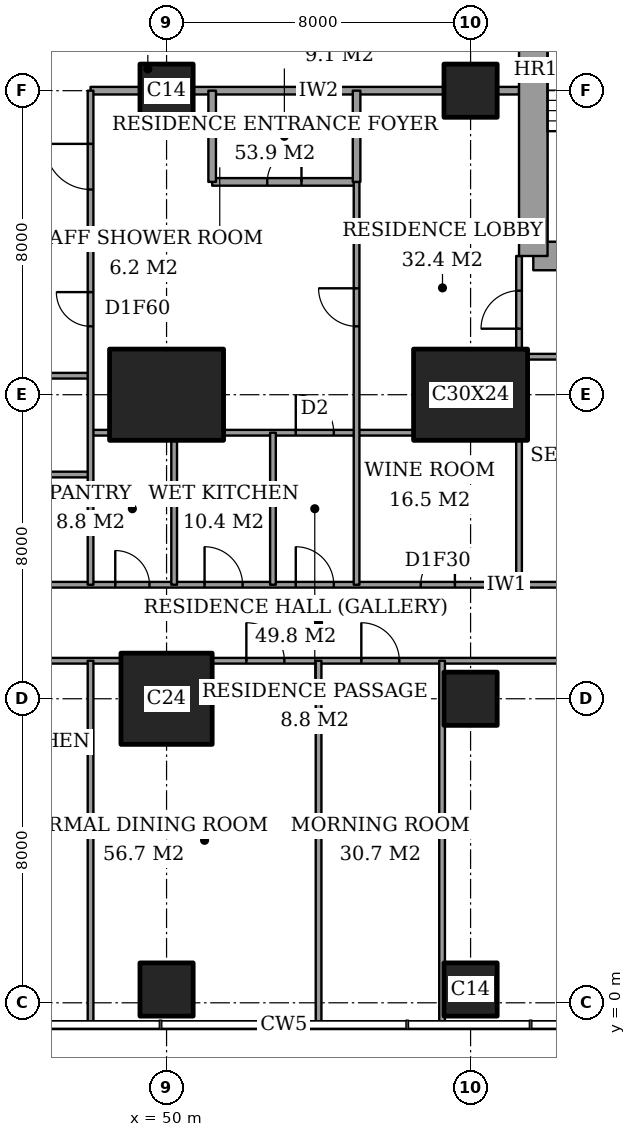
"""IFC4 building model, lengths in metres.
Left out: names, types, materials, properties, quantities, classifications, styles, units other than length and angle.
Written with IfcOpenShell. Run it as: python <this file> out.ifc"""

import sys

from ifc_helpers import new_model, si_unit, direction, frame, frame_2d, origin, origin_2d, place, context, subcontext, project, spatial, rectangle, extrude, element, fill, save


model = new_model("IFC4")
c1 = context("Model", 3, precision=1e-05, world=origin(), true_north=direction((0.0, 1.0)))
c2 = subcontext(c1, "Body", "Model", "MODEL_VIEW")
j1 = project(units=[si_unit("LENGTHUNIT", "METRE"), si_unit("PLANEANGLEUNIT", "RADIAN")], contexts=[c1])
p1 = place(None, origin())
s1 = spatial("IfcSite", under=j1, at=p1, CompositionType="ELEMENT")
p2 = place(p1, origin())
s2 = spatial("IfcBuilding", under=s1, at=p2, CompositionType="ELEMENT")
p3 = place(p2, frame((0.0, 0.0, 282.6)))
s3 = spatial("IfcBuildingStorey", under=s2, at=p3, CompositionType="ELEMENT", Elevation=282.6)
p4 = place(p3, frame((50.0, 0.35, 0.0), z_axis=(0.0, 0.0, 1.0), x_axis=(1.0, 0.0, 0.0)))
e1 = element("IfcColumn", 1, at=p4, inside=s3, PredefinedType="COLUMN", context=c2, shape_type="SweptSolid", body=[
    extrude(rectangle(XDim=1.4, YDim=1.4, at=origin_2d()), origin(), (0.0, 0.0, 1.0), 4.5),
])
p5 = place(p3, frame((50.0, 8.0, 0.0), z_axis=(0.0, 0.0, 1.0), x_axis=(1.0, 0.0, 0.0)))
e2 = element("IfcColumn", 2, at=p5, inside=s3, PredefinedType="COLUMN", context=c2, shape_type="SweptSolid", body=[
    extrude(rectangle(XDim=2.4, YDim=2.4, at=origin_2d()), origin(), (0.0, 0.0, 1.0), 4.5),
])
p6 = place(p3, frame((50.0, 16.0, 0.0), z_axis=(0.0, 0.0, 1.0), x_axis=(1.0, 0.0, 0.0)))
e3 = element("IfcColumn", 3, at=p6, inside=s3, PredefinedType="COLUMN", context=c2, shape_type="SweptSolid", body=[
    extrude(rectangle(XDim=3.0, YDim=2.4, at=origin_2d()), origin(), (0.0, 0.0, 1.0), 4.5),
])
for number, where, z_axis, x_axis in (
    (4, (50.0, 24.0, 0.0), (0.0, 0.0, 1.0), (1.0, 0.0, 0.0)),
    (5, (58.0, 0.35, 0.0), (0.0, 0.0, 1.0), (1.0, 0.0, 0.0)),
    (6, (58.0, 8.0, 0.0), (0.0, 0.0, 1.0), (1.0, 0.0, 0.0)),
):
    element("IfcColumn", number, at=place(p3, frame(where, z_axis=z_axis, x_axis=x_axis)), inside=s3, PredefinedType="COLUMN", context=c2, shape_type="SweptSolid", body=[
        extrude(rectangle(XDim=1.4, YDim=1.4, at=origin_2d()), origin(), (0.0, 0.0, 1.0), 4.5),
    ])
p7 = place(p3, frame((58.0, 16.0, 0.0), z_axis=(0.0, 0.0, 1.0), x_axis=(1.0, 0.0, 0.0)))
e7 = element("IfcColumn", 7, at=p7, inside=s3, PredefinedType="COLUMN", context=c2, shape_type="SweptSolid", body=[
    extrude(rectangle(XDim=3.0, YDim=2.4, at=origin_2d()), origin(), (0.0, 0.0, 1.0), 4.5),
])
p8 = place(p3, frame((58.0, 24.0, 0.0), z_axis=(0.0, 0.0, 1.0), x_axis=(1.0, 0.0, 0.0)))
e8 = element("IfcColumn", 8, at=p8, inside=s3, PredefinedType="COLUMN", context=c2, shape_type="SweptSolid", body=[
    extrude(rectangle(XDim=1.4, YDim=1.4, at=origin_2d()), origin(), (0.0, 0.0, 1.0), 4.5),
])
p9 = place(p3, frame((59.65, 19.65, 0.0), z_axis=(0.0, 0.0, 1.0), x_axis=(1.0, 0.0, 0.0)))
e9 = element("IfcWall", 9, at=p9, inside=s3, PredefinedType="SHEAR", context=c2, shape_type="SweptSolid", body=[
    extrude(rectangle(XDim=4.45, YDim=0.75, at=frame_2d((2.225, 0.0))), origin(), (0.0, 0.0, 1.0), 4.5),
])
p10 = place(p3, frame((59.65, 28.35, 0.0), z_axis=(0.0, 0.0, 1.0), x_axis=(0.0, -1.0, 0.0)))
e10 = element("IfcWall", 10, at=p10, inside=s3, PredefinedType="SHEAR", context=c2, shape_type="SweptSolid", body=[
    extrude(rectangle(XDim=8.7, YDim=0.75, at=frame_2d((4.35, 0.0))), origin(), (0.0, 0.0, 1.0), 4.5),
])
p11 = place(p10, frame((0.975, 0.0, 0.0)))
e11 = element("IfcOpeningElement", 11, at=p11, cuts=e10, PredefinedType="OPENING", context=c2, shape_type="SweptSolid", body=[
    extrude(rectangle(XDim=1.0, YDim=2.1, at=frame_2d((0.5, 1.05))), frame((0.0, 0.385, 0.0), z_axis=(0.0, -1.0, 0.0), x_axis=(1.0, 0.0, 0.0)), (0.0, 0.0, 1.0), 0.77),
])
p12 = place(p3, frame((43.35, 9.0, 0.0), z_axis=(0.0, 0.0, 1.0), x_axis=(1.0, 0.0, 0.0)))
e12 = element("IfcWall", 12, at=p12, inside=s3, PredefinedType="PARTITIONING", context=c2, shape_type="SweptSolid", body=[
    extrude(rectangle(XDim=5.45, YDim=0.15, at=frame_2d((2.725, 0.0))), origin(), (0.0, 0.0, 1.0), 4.25),
])
p13 = place(p12, frame((1.9, 0.0, 0.0)))
e13 = element("IfcOpeningElement", 13, at=p13, cuts=e12, PredefinedType="OPENING", context=c2, shape_type="SweptSolid", body=[
    extrude(rectangle(XDim=1.0, YDim=2.1, at=frame_2d((0.5, 1.05))), frame((0.0, 0.085, 0.0), z_axis=(0.0, -1.0, 0.0), x_axis=(1.0, 0.0, 0.0)), (0.0, 0.0, 1.0), 0.17),
])
p14 = place(p3, frame((51.2, 9.0, 0.0), z_axis=(0.0, 0.0, 1.0), x_axis=(1.0, 0.0, 0.0)))
e14 = element("IfcWall", 14, at=p14, inside=s3, PredefinedType="PARTITIONING", context=c2, shape_type="SweptSolid", body=[
    extrude(rectangle(XDim=15.25, YDim=0.15, at=frame_2d((7.625, 0.0))), origin(), (0.0, 0.0, 1.0), 4.25),
])
p15 = place(p14, frame((10.15, 0.0, 0.0)))
e15 = element("IfcOpeningElement", 15, at=p15, cuts=e14, PredefinedType="OPENING", context=c2, shape_type="SweptSolid", body=[
    extrude(rectangle(XDim=1.0, YDim=2.1, at=frame_2d((0.5, 1.05))), frame((0.0, 0.085, 0.0), z_axis=(0.0, -1.0, 0.0), x_axis=(1.0, 0.0, 0.0)), (0.0, 0.0, 1.0), 0.17),
])
p16 = place(p14, frame((3.925, 0.0, 0.0)))
e16 = element("IfcOpeningElement", 16, at=p16, cuts=e14, PredefinedType="OPENING", context=c2, shape_type="SweptSolid", body=[
    extrude(rectangle(XDim=1.0, YDim=2.1, at=frame_2d((0.5, 1.05))), frame((0.0, 0.085, 0.0), z_axis=(0.0, -1.0, 0.0), x_axis=(1.0, 0.0, 0.0)), (0.0, 0.0, 1.0), 0.17),
])
p17 = place(p14, frame((0.9, 0.0, 0.0)))
e17 = element("IfcOpeningElement", 17, at=p17, cuts=e14, PredefinedType="OPENING", context=c2, shape_type="SweptSolid", body=[
    extrude(rectangle(XDim=1.0, YDim=2.1, at=frame_2d((0.5, 1.05))), frame((0.0, 0.085, 0.0), z_axis=(0.0, -1.0, 0.0), x_axis=(1.0, 0.0, 0.0)), (0.0, 0.0, 1.0), 0.17),
])
p18 = place(p3, frame((41.439, 11.0, 0.0), z_axis=(0.0, 0.0, 1.0), x_axis=(1.0, 0.0, 0.0)))
e18 = element("IfcWall", 18, at=p18, inside=s3, PredefinedType="PARTITIONING", context=c2, shape_type="SweptSolid", body=[
    extrude(rectangle(XDim=25.011, YDim=0.15, at=frame_2d((12.505, 0.0))), origin(), (0.0, 0.0, 1.0), 4.25),
])
p19 = place(p18, frame((11.961, 0.0, 0.0)))
e19 = element("IfcOpeningElement", 19, at=p19, cuts=e18, PredefinedType="OPENING", context=c2, shape_type="SweptSolid", body=[
    extrude(rectangle(XDim=1.0, YDim=2.1, at=frame_2d((0.5, 1.05))), frame((0.0, 0.085, 0.0), z_axis=(0.0, -1.0, 0.0), x_axis=(1.0, 0.0, 0.0)), (0.0, 0.0, 1.0), 0.17),
])
p20 = place(p18, frame((20.924, 0.0, 0.0)))
e20 = element("IfcOpeningElement", 20, at=p20, cuts=e18, PredefinedType="OPENING", context=c2, shape_type="SweptSolid", body=[
    extrude(rectangle(XDim=1.0, YDim=2.1, at=frame_2d((0.5, 1.05))), frame((0.0, 0.085, 0.0), z_axis=(0.0, -1.0, 0.0), x_axis=(1.0, 0.0, 0.0)), (0.0, 0.0, 1.0), 0.17),
])
p21 = place(p18, frame((15.249, 0.0, 0.0)))
e21 = element("IfcOpeningElement", 21, at=p21, cuts=e18, PredefinedType="OPENING", context=c2, shape_type="SweptSolid", body=[
    extrude(rectangle(XDim=0.9, YDim=2.1, at=frame_2d((0.45, 1.05))), frame((0.0, 0.085, 0.0), z_axis=(0.0, -1.0, 0.0), x_axis=(1.0, 0.0, 0.0)), (0.0, 0.0, 1.0), 0.17),
])
p22 = place(p18, frame((9.561, 0.0, 0.0)))
e22 = element("IfcOpeningElement", 22, at=p22, cuts=e18, PredefinedType="OPENING", context=c2, shape_type="SweptSolid", body=[
    extrude(rectangle(XDim=1.0, YDim=2.1, at=frame_2d((0.5, 1.05))), frame((0.0, 0.085, 0.0), z_axis=(0.0, -1.0, 0.0), x_axis=(1.0, 0.0, 0.0)), (0.0, 0.0, 1.0), 0.17),
])
p23 = place(p18, frame((7.211, 0.0, 0.0)))
e23 = element("IfcOpeningElement", 23, at=p23, cuts=e18, PredefinedType="OPENING", context=c2, shape_type="SweptSolid", body=[
    extrude(rectangle(XDim=0.9, YDim=2.1, at=frame_2d((0.45, 1.05))), frame((0.0, 0.085, 0.0), z_axis=(0.0, -1.0, 0.0), x_axis=(1.0, 0.0, 0.0)), (0.0, 0.0, 1.0), 0.17),
])
p24 = place(p18, frame((2.836, 0.0, 0.0)))
e24 = element("IfcOpeningElement", 24, at=p24, cuts=e18, PredefinedType="OPENING", context=c2, shape_type="SweptSolid", body=[
    extrude(rectangle(XDim=1.0, YDim=2.1, at=frame_2d((0.5, 1.05))), frame((0.0, 0.085, 0.0), z_axis=(0.0, -1.0, 0.0), x_axis=(1.0, 0.0, 0.0)), (0.0, 0.0, 1.0), 0.17),
])
p25 = place(p3, frame((45.6, 13.9, 0.0), z_axis=(0.0, 0.0, 1.0), x_axis=(1.0, 0.0, 0.0)))
e25 = element("IfcWall", 25, at=p25, inside=s3, PredefinedType="PARTITIONING", context=c2, shape_type="SweptSolid", body=[
    extrude(rectangle(XDim=2.4, YDim=0.15, at=frame_2d((1.2, 0.0))), origin(), (0.0, 0.0, 1.0), 4.25),
])
p26 = place(p3, frame((48.0, 15.0, 0.0), z_axis=(0.0, 0.0, 1.0), x_axis=(1.0, 0.0, 0.0)))
e26 = element("IfcWall", 26, at=p26, inside=s3, PredefinedType="PARTITIONING", context=c2, shape_type="SweptSolid", body=[
    extrude(rectangle(XDim=0.5, YDim=0.15, at=frame_2d((0.25, 0.0))), origin(), (0.0, 0.0, 1.0), 4.25),
])
p27 = place(p3, frame((51.5, 15.0, 0.0), z_axis=(0.0, 0.0, 1.0), x_axis=(1.0, 0.0, 0.0)))
e27 = element("IfcWall", 27, at=p27, inside=s3, PredefinedType="PARTITIONING", context=c2, shape_type="SweptSolid", body=[
    extrude(rectangle(XDim=5.0, YDim=0.15, at=frame_2d((2.5, 0.0))), origin(), (0.0, 0.0, 1.0), 4.25),
])
p28 = place(p27, frame((1.9, 0.0, 0.0)))
e28 = element("IfcOpeningElement", 28, at=p28, cuts=e27, PredefinedType="OPENING", context=c2, shape_type="SweptSolid", body=[
    extrude(rectangle(XDim=1.0, YDim=2.1, at=frame_2d((0.5, 1.05))), frame((0.0, 0.085, 0.0), z_axis=(0.0, -1.0, 0.0), x_axis=(1.0, 0.0, 0.0)), (0.0, 0.0, 1.0), 0.17),
])
p29 = place(p3, frame((42.0, 16.5, 0.0), z_axis=(0.0, 0.0, 1.0), x_axis=(1.0, 0.0, 0.0)))
e29 = element("IfcWall", 29, at=p29, inside=s3, PredefinedType="PARTITIONING", context=c2, shape_type="SweptSolid", body=[
    extrude(rectangle(XDim=6.0, YDim=0.15, at=frame_2d((3.0, 0.0))), origin(), (0.0, 0.0, 1.0), 4.25),
])
p30 = place(p3, frame((59.5, 17.0, 0.0), z_axis=(0.0, 0.0, 1.0), x_axis=(1.0, 0.0, 0.0)))
e30 = element("IfcWall", 30, at=p30, inside=s3, PredefinedType="PARTITIONING", context=c2, shape_type="SweptSolid", body=[
    extrude(rectangle(XDim=6.95, YDim=0.15, at=frame_2d((3.475, 0.0))), origin(), (0.0, 0.0, 1.0), 4.25),
])
p31 = place(p3, frame((42.0, 20.0, 0.0), z_axis=(0.0, 0.0, 1.0), x_axis=(1.0, 0.0, 0.0)))
e31 = element("IfcWall", 31, at=p31, inside=s3, PredefinedType="PARTITIONING", context=c2, shape_type="SweptSolid", body=[
    extrude(rectangle(XDim=6.0, YDim=0.2, at=frame_2d((3.0, 0.0))), origin(), (0.0, 0.0, 1.0), 4.25),
])
p32 = place(p3, frame((51.2, 21.6, 0.0), z_axis=(0.0, 0.0, 1.0), x_axis=(1.0, 0.0, 0.0)))
e32 = element("IfcWall", 32, at=p32, inside=s3, PredefinedType="PARTITIONING", context=c2, shape_type="SweptSolid", body=[
    extrude(rectangle(XDim=3.8, YDim=0.2, at=frame_2d((1.9, 0.0))), origin(), (0.0, 0.0, 1.0), 4.25),
])
p33 = place(p32, frame((1.45, 0.0, 0.0)))
e33 = element("IfcOpeningElement", 33, at=p33, cuts=e32, PredefinedType="OPENING", context=c2, shape_type="SweptSolid", body=[
    extrude(rectangle(XDim=0.9, YDim=2.1, at=frame_2d((0.45, 1.05))), frame((0.0, 0.11, 0.0), z_axis=(0.0, -1.0, 0.0), x_axis=(1.0, 0.0, 0.0)), (0.0, 0.0, 1.0), 0.22),
])
p34 = place(p3, frame((48.0, 24.0, 0.0), z_axis=(0.0, 0.0, 1.0), x_axis=(1.0, 0.0, 0.0)))
e34 = element("IfcWall", 34, at=p34, inside=s3, PredefinedType="PARTITIONING", context=c2, shape_type="SweptSolid", body=[
    extrude(rectangle(XDim=1.3, YDim=0.2, at=frame_2d((0.65, 0.0))), origin(), (0.0, 0.0, 1.0), 4.25),
])
p35 = place(p3, frame((50.7, 24.0, 0.0), z_axis=(0.0, 0.0, 1.0), x_axis=(1.0, 0.0, 0.0)))
e35 = element("IfcWall", 35, at=p35, inside=s3, PredefinedType="PARTITIONING", context=c2, shape_type="SweptSolid", body=[
    extrude(rectangle(XDim=6.6, YDim=0.2, at=frame_2d((3.3, 0.0))), origin(), (0.0, 0.0, 1.0), 4.25),
])
p36 = place(p3, frame((58.7, 24.0, 0.0), z_axis=(0.0, 0.0, 1.0), x_axis=(1.0, 0.0, 0.0)))
e36 = element("IfcWall", 36, at=p36, inside=s3, PredefinedType="PARTITIONING", context=c2, shape_type="SweptSolid", body=[
    extrude(rectangle(XDim=0.575, YDim=0.2, at=frame_2d((0.288, 0.0))), origin(), (0.0, 0.0, 1.0), 4.25),
])
p37 = place(p3, frame((48.0, -0.561, 0.0), z_axis=(0.0, 0.0, 1.0), x_axis=(0.0, 1.0, 0.0)))
e37 = element("IfcWall", 37, at=p37, inside=s3, PredefinedType="PARTITIONING", context=c2, shape_type="SweptSolid", body=[
    extrude(rectangle(XDim=9.561, YDim=0.15, at=frame_2d((4.781, 0.0))), origin(), (0.0, 0.0, 1.0), 4.25),
])
p38 = place(p3, frame((48.0, 11.0, 0.0), z_axis=(0.0, 0.0, 1.0), x_axis=(0.0, 1.0, 0.0)))
e38 = element("IfcWall", 38, at=p38, inside=s3, PredefinedType="PARTITIONING", context=c2, shape_type="SweptSolid", body=[
    extrude(rectangle(XDim=13.0, YDim=0.15, at=frame_2d((6.5, 0.0))), origin(), (0.0, 0.0, 1.0), 4.25),
])
p39 = place(p38, frame((10.4, 0.0, 0.0)))
e39 = element("IfcOpeningElement", 39, at=p39, cuts=e38, PredefinedType="OPENING", context=c2, shape_type="SweptSolid", body=[
    extrude(rectangle(XDim=1.2, YDim=2.4, at=frame_2d((0.6, 1.2))), frame((0.0, 0.085, 0.0), z_axis=(0.0, -1.0, 0.0), x_axis=(1.0, 0.0, 0.0)), (0.0, 0.0, 1.0), 0.17),
])
p40 = place(p38, frame((6.8, 0.0, 0.0)))
e40 = element("IfcOpeningElement", 40, at=p40, cuts=e38, PredefinedType="OPENING", context=c2, shape_type="SweptSolid", body=[
    extrude(rectangle(XDim=0.9, YDim=2.1, at=frame_2d((0.45, 1.05))), frame((0.0, 0.085, 0.0), z_axis=(0.0, -1.0, 0.0), x_axis=(1.0, 0.0, 0.0)), (0.0, 0.0, 1.0), 0.17),
])
p41 = place(p3, frame((50.2, 11.0, 0.0), z_axis=(0.0, 0.0, 1.0), x_axis=(0.0, 1.0, 0.0)))
e41 = element("IfcWall", 41, at=p41, inside=s3, PredefinedType="PARTITIONING", context=c2, shape_type="SweptSolid", body=[
    extrude(rectangle(XDim=3.8, YDim=0.15, at=frame_2d((1.9, 0.0))), origin(), (0.0, 0.0, 1.0), 4.25),
])
p42 = place(p3, frame((51.2, 21.6, 0.0), z_axis=(0.0, 0.0, 1.0), x_axis=(0.0, 1.0, 0.0)))
e42 = element("IfcWall", 42, at=p42, inside=s3, PredefinedType="PARTITIONING", context=c2, shape_type="SweptSolid", body=[
    extrude(rectangle(XDim=2.4, YDim=0.2, at=frame_2d((1.2, 0.0))), origin(), (0.0, 0.0, 1.0), 4.25),
])
p43 = place(p3, frame((52.8, 11.0, 0.0), z_axis=(0.0, 0.0, 1.0), x_axis=(0.0, 1.0, 0.0)))
e43 = element("IfcWall", 43, at=p43, inside=s3, PredefinedType="PARTITIONING", context=c2, shape_type="SweptSolid", body=[
    extrude(rectangle(XDim=4.0, YDim=0.15, at=frame_2d((2.0, 0.0))), origin(), (0.0, 0.0, 1.0), 4.25),
])
p44 = place(p3, frame((54.0, -0.561, 0.0), z_axis=(0.0, 0.0, 1.0), x_axis=(0.0, 1.0, 0.0)))
e44 = element("IfcWall", 44, at=p44, inside=s3, PredefinedType="PARTITIONING", context=c2, shape_type="SweptSolid", body=[
    extrude(rectangle(XDim=9.561, YDim=0.15, at=frame_2d((4.781, 0.0))), origin(), (0.0, 0.0, 1.0), 4.25),
])
p45 = place(p3, frame((55.0, 21.6, 0.0), z_axis=(0.0, 0.0, 1.0), x_axis=(0.0, 1.0, 0.0)))
e45 = element("IfcWall", 45, at=p45, inside=s3, PredefinedType="PARTITIONING", context=c2, shape_type="SweptSolid", body=[
    extrude(rectangle(XDim=2.4, YDim=0.2, at=frame_2d((1.2, 0.0))), origin(), (0.0, 0.0, 1.0), 4.25),
])
p46 = place(p3, frame((55.0, 11.0, 0.0), z_axis=(0.0, 0.0, 1.0), x_axis=(0.0, 1.0, 0.0)))
e46 = element("IfcWall", 46, at=p46, inside=s3, PredefinedType="PARTITIONING", context=c2, shape_type="SweptSolid", body=[
    extrude(rectangle(XDim=10.6, YDim=0.15, at=frame_2d((5.3, 0.0))), origin(), (0.0, 0.0, 1.0), 4.25),
])
p47 = place(p46, frame((6.8, 0.0, 0.0)))
e47 = element("IfcOpeningElement", 47, at=p47, cuts=e46, PredefinedType="OPENING", context=c2, shape_type="SweptSolid", body=[
    extrude(rectangle(XDim=1.0, YDim=2.1, at=frame_2d((0.5, 1.05))), frame((0.0, 0.085, 0.0), z_axis=(0.0, -1.0, 0.0), x_axis=(1.0, 0.0, 0.0)), (0.0, 0.0, 1.0), 0.17),
])
p48 = place(p3, frame((57.25, -0.561, 0.0), z_axis=(0.0, 0.0, 1.0), x_axis=(0.0, 1.0, 0.0)))
e48 = element("IfcWall", 48, at=p48, inside=s3, PredefinedType="PARTITIONING", context=c2, shape_type="SweptSolid", body=[
    extrude(rectangle(XDim=9.561, YDim=0.15, at=frame_2d((4.781, 0.0))), origin(), (0.0, 0.0, 1.0), 4.25),
])
p49 = place(p3, frame((59.275, 11.0, 0.0), z_axis=(0.0, 0.0, 1.0), x_axis=(0.0, 1.0, 0.0)))
e49 = element("IfcWall", 49, at=p49, inside=s3, PredefinedType="PARTITIONING", context=c2, shape_type="SweptSolid", body=[
    extrude(rectangle(XDim=3.8, YDim=0.15, at=frame_2d((1.9, 0.0))), origin(), (0.0, 0.0, 1.0), 4.25),
])
p50 = place(p3, frame((59.275, 17.2, 0.0), z_axis=(0.0, 0.0, 1.0), x_axis=(0.0, 1.0, 0.0)))
e50 = element("IfcWall", 50, at=p50, inside=s3, PredefinedType="PARTITIONING", context=c2, shape_type="SweptSolid", body=[
    extrude(rectangle(XDim=2.45, YDim=0.15, at=frame_2d((1.225, 0.0))), origin(), (0.0, 0.0, 1.0), 4.25),
])
p51 = place(p50, frame((0.538, 0.0, 0.0)))
e51 = element("IfcOpeningElement", 51, at=p51, cuts=e50, PredefinedType="OPENING", context=c2, shape_type="SweptSolid", body=[
    extrude(rectangle(XDim=1.0, YDim=2.1, at=frame_2d((0.5, 1.05))), frame((0.0, 0.085, 0.0), z_axis=(0.0, -1.0, 0.0), x_axis=(1.0, 0.0, 0.0)), (0.0, 0.0, 1.0), 0.17),
])
p52 = place(p16, origin())
e52 = element("IfcDoor", 52, at=p52, inside=s3, OperationType="SINGLE_SWING_RIGHT", PredefinedType="DOOR", context=c2, shape_type="SweptSolid", body=[
    extrude(rectangle(XDim=1.0, YDim=2.1, at=frame_2d((0.5, 1.05))), frame((0.0, 0.025, 0.0), z_axis=(0.0, -1.0, 0.0), x_axis=(1.0, 0.0, 0.0)), (0.0, 0.0, 1.0), 0.05),
])
fill(e16, e52)
p53 = place(p17, origin())
e53 = element("IfcDoor", 53, at=p53, inside=s3, OperationType="SINGLE_SWING_RIGHT", PredefinedType="DOOR", context=c2, shape_type="SweptSolid", body=[
    extrude(rectangle(XDim=1.0, YDim=2.1, at=frame_2d((0.5, 1.05))), frame((0.0, 0.025, 0.0), z_axis=(0.0, -1.0, 0.0), x_axis=(1.0, 0.0, 0.0)), (0.0, 0.0, 1.0), 0.05),
])
fill(e17, e53)
p54 = place(p19, origin())
e54 = element("IfcDoor", 54, at=p54, inside=s3, OperationType="SINGLE_SWING_RIGHT", PredefinedType="DOOR", context=c2, shape_type="SweptSolid", body=[
    extrude(rectangle(XDim=1.0, YDim=2.1, at=frame_2d((0.5, 1.05))), frame((0.0, 0.025, 0.0), z_axis=(0.0, -1.0, 0.0), x_axis=(1.0, 0.0, 0.0)), (0.0, 0.0, 1.0), 0.05),
])
fill(e19, e54)
p55 = place(p51, origin())
e55 = element("IfcDoor", 55, at=p55, inside=s3, OperationType="SINGLE_SWING_RIGHT", PredefinedType="DOOR", context=c2, shape_type="SweptSolid", body=[
    extrude(rectangle(XDim=1.0, YDim=2.1, at=frame_2d((0.5, 1.05))), frame((0.0, 0.025, 0.0), z_axis=(0.0, -1.0, 0.0), x_axis=(1.0, 0.0, 0.0)), (0.0, 0.0, 1.0), 0.05),
])
fill(e51, e55)
p56 = place(p21, origin())
e56 = element("IfcDoor", 56, at=p56, inside=s3, OperationType="SINGLE_SWING_LEFT", PredefinedType="DOOR", context=c2, shape_type="SweptSolid", body=[
    extrude(rectangle(XDim=0.9, YDim=2.1, at=frame_2d((0.45, 1.05))), frame((0.0, 0.025, 0.0), z_axis=(0.0, -1.0, 0.0), x_axis=(1.0, 0.0, 0.0)), (0.0, 0.0, 1.0), 0.05),
])
fill(e21, e56)
p57 = place(p47, origin())
e57 = element("IfcDoor", 57, at=p57, inside=s3, OperationType="SINGLE_SWING_LEFT", PredefinedType="DOOR", context=c2, shape_type="SweptSolid", body=[
    extrude(rectangle(XDim=1.0, YDim=2.1, at=frame_2d((0.5, 1.05))), frame((0.0, 0.025, 0.0), z_axis=(0.0, -1.0, 0.0), x_axis=(1.0, 0.0, 0.0)), (0.0, 0.0, 1.0), 0.05),
])
fill(e47, e57)
p58 = place(p33, origin())
e58 = element("IfcDoor", 58, at=p58, inside=s3, OperationType="SINGLE_SWING_LEFT", PredefinedType="DOOR", context=c2, shape_type="SweptSolid", body=[
    extrude(rectangle(XDim=0.9, YDim=2.1, at=frame_2d((0.45, 1.05))), frame((0.0, 0.025, 0.0), z_axis=(0.0, -1.0, 0.0), x_axis=(1.0, 0.0, 0.0)), (0.0, 0.0, 1.0), 0.05),
])
fill(e33, e58)
p59 = place(p39, origin())
e59 = element("IfcDoor", 59, at=p59, inside=s3, OperationType="SINGLE_SWING_LEFT", PredefinedType="DOOR", context=c2, shape_type="SweptSolid", body=[
    extrude(rectangle(XDim=1.2, YDim=2.4, at=frame_2d((0.6, 1.2))), frame((0.0, 0.025, 0.0), z_axis=(0.0, -1.0, 0.0), x_axis=(1.0, 0.0, 0.0)), (0.0, 0.0, 1.0), 0.05),
])
fill(e39, e59)
p60 = place(p28, origin())
e60 = element("IfcDoor", 60, at=p60, inside=s3, OperationType="SINGLE_SWING_RIGHT", PredefinedType="DOOR", context=c2, shape_type="SweptSolid", body=[
    extrude(rectangle(XDim=1.0, YDim=2.1, at=frame_2d((0.5, 1.05))), frame((0.0, 0.025, 0.0), z_axis=(0.0, -1.0, 0.0), x_axis=(1.0, 0.0, 0.0)), (0.0, 0.0, 1.0), 0.05),
])
fill(e28, e60)
p61 = place(p22, origin())
e61 = element("IfcDoor", 61, at=p61, inside=s3, OperationType="SINGLE_SWING_RIGHT", PredefinedType="DOOR", context=c2, shape_type="SweptSolid", body=[
    extrude(rectangle(XDim=1.0, YDim=2.1, at=frame_2d((0.5, 1.05))), frame((0.0, 0.025, 0.0), z_axis=(0.0, -1.0, 0.0), x_axis=(1.0, 0.0, 0.0)), (0.0, 0.0, 1.0), 0.05),
])
fill(e22, e61)
p62 = place(p23, origin())
e62 = element("IfcDoor", 62, at=p62, inside=s3, OperationType="SINGLE_SWING_RIGHT", PredefinedType="DOOR", context=c2, shape_type="SweptSolid", body=[
    extrude(rectangle(XDim=0.9, YDim=2.1, at=frame_2d((0.45, 1.05))), frame((0.0, 0.025, 0.0), z_axis=(0.0, -1.0, 0.0), x_axis=(1.0, 0.0, 0.0)), (0.0, 0.0, 1.0), 0.05),
])
fill(e23, e62)
p63 = place(p40, origin())
e63 = element("IfcDoor", 63, at=p63, inside=s3, OperationType="SINGLE_SWING_LEFT", PredefinedType="DOOR", context=c2, shape_type="SweptSolid", body=[
    extrude(rectangle(XDim=0.9, YDim=2.1, at=frame_2d((0.45, 1.05))), frame((0.0, 0.025, 0.0), z_axis=(0.0, -1.0, 0.0), x_axis=(1.0, 0.0, 0.0)), (0.0, 0.0, 1.0), 0.05),
])
fill(e40, e63)
save(model, sys.argv[1])
